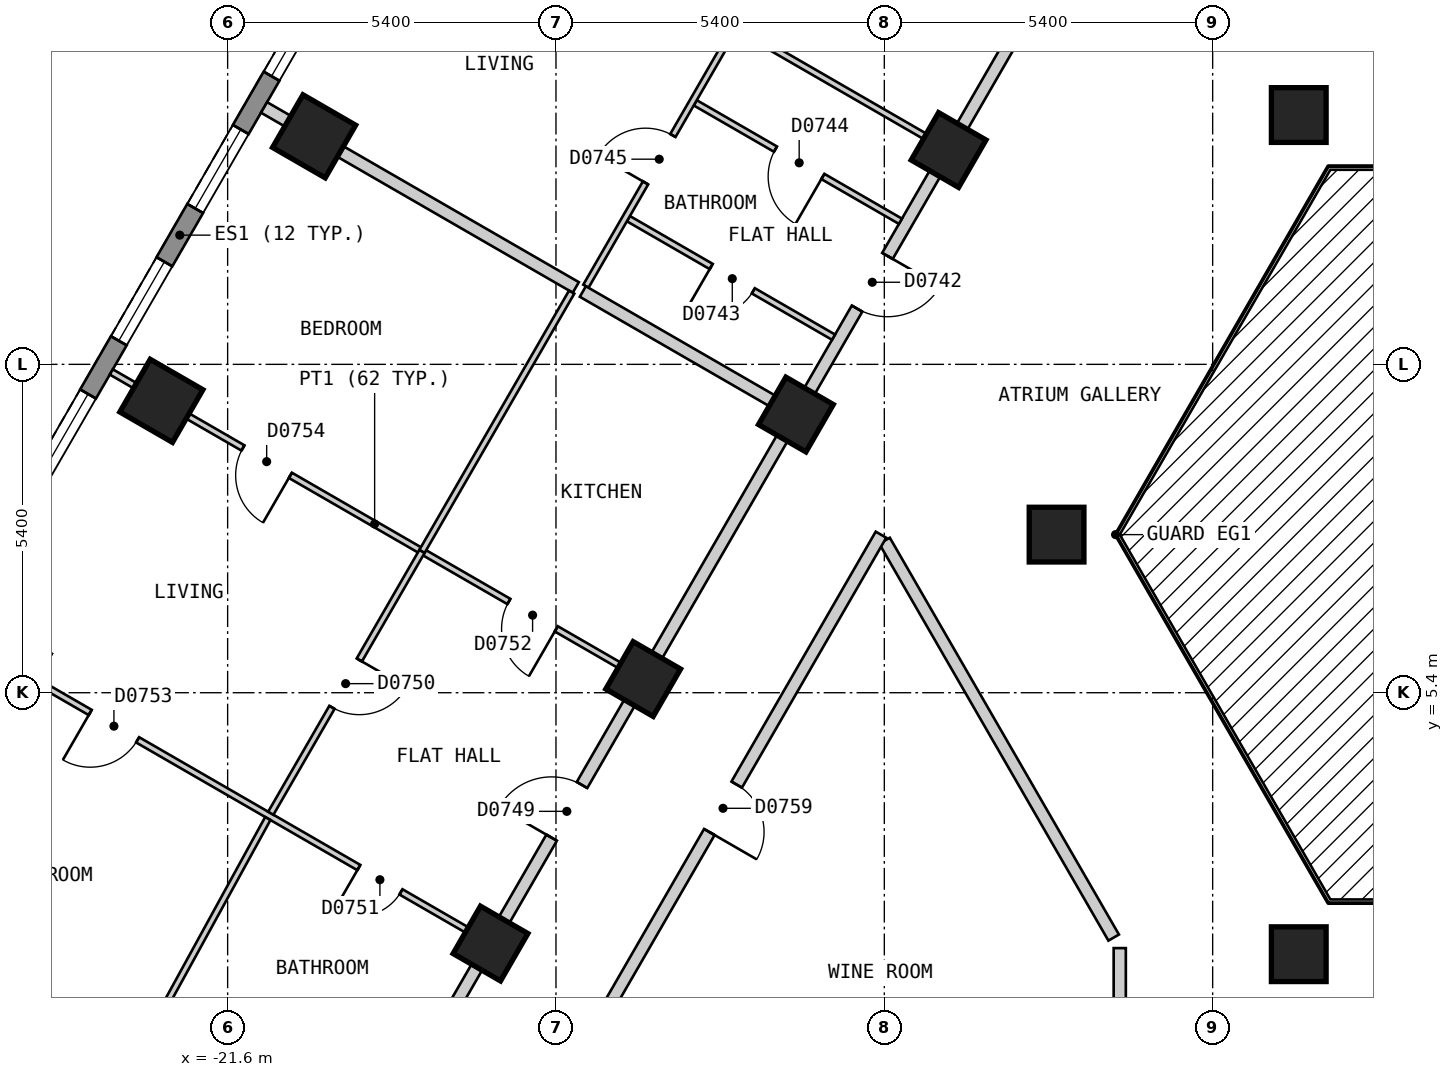
"""IFC4 building model, lengths in metres.
Left out: names, types, materials, properties, quantities, classifications, styles, units other than length and angle.
Written with IfcOpenShell. Run it as: python <this file> out.ifc"""

import sys

from ifc_helpers import new_model, si_unit, direction, frame, frame_2d, origin, origin_2d, place, context, subcontext, project, spatial, polyline, rectangle, outline, extrude, element, fill, save


model = new_model("IFC4")
c1 = context("Model", 3, precision=1e-05, world=origin(), true_north=direction((0.0, 1.0)))
c2 = subcontext(c1, "Body", "Model", "MODEL_VIEW")
j1 = project(units=[si_unit("LENGTHUNIT", "METRE"), si_unit("PLANEANGLEUNIT", "RADIAN")], contexts=[c1])
p1 = place(None, origin())
s1 = spatial("IfcSite", under=j1, at=p1, CompositionType="ELEMENT")
p2 = place(p1, origin())
s2 = spatial("IfcBuilding", under=s1, at=p2, CompositionType="ELEMENT")
p3 = place(p2, frame((0.0, 0.0, 99.0)))
s3 = spatial("IfcBuildingStorey", under=s2, at=p3, CompositionType="ELEMENT", Elevation=99.0)
for number, where, z_axis, x_axis in (
    (1, (-20.178, 14.55, 0.0), (0.0, 0.0, 1.0), (-0.5, -0.866, 0.0)),
    (2, (-22.69, 10.2, 0.0), (0.0, 0.0, 1.0), (-0.5, -0.866, 0.0)),
):
    element("IfcColumn", number, at=place(p3, frame(where, z_axis=z_axis, x_axis=x_axis)), inside=s3, PredefinedType="COLUMN", context=c2, shape_type="SweptSolid", body=[
        extrude(rectangle(XDim=1.0, YDim=1.0, at=origin_2d()), origin(), (0.0, 0.0, 1.0), 3.0),
    ])
for number, where, z_axis, x_axis in (
    (3, (-3.984, 14.9, 0.0), (0.0, 0.0, 1.0), (1.0, 0.0, 0.0)),
    (4, (-9.743, 14.325, 0.0), (0.0, 0.0, 1.0), (-0.5, -0.866, 0.0)),
    (5, (-7.967, 8.0, 0.0), (0.0, 0.0, 1.0), (1.0, 0.0, 0.0)),
    (6, (-12.254, 9.975, 0.0), (0.0, 0.0, 1.0), (-0.5, -0.866, 0.0)),
    (7, (-14.766, 5.625, 0.0), (0.0, 0.0, 1.0), (-0.5, -0.866, 0.0)),
    (8, (-3.984, 1.1, 0.0), (0.0, 0.0, 1.0), (1.0, 0.0, 0.0)),
    (9, (-17.277, 1.275, 0.0), (0.0, 0.0, 1.0), (-0.5, -0.866, 0.0)),
):
    element("IfcColumn", number, at=place(p3, frame(where, z_axis=z_axis, x_axis=x_axis)), inside=s3, PredefinedType="COLUMN", context=c2, shape_type="SweptSolid", body=[
        extrude(rectangle(XDim=0.9, YDim=0.9, at=origin_2d()), origin(), (0.0, 0.0, 1.0), 3.0),
    ])
p4 = place(p3, frame((-15.747, 24.425, 0.0), z_axis=(0.0, 0.0, 1.0), x_axis=(-0.500027479704, -0.866009537788, 0.0)))
e10 = element("IfcWall", 10, at=p4, inside=s3, PredefinedType="SOLIDWALL", context=c2, shape_type="SweptSolid", body=[
    extrude(outline(polyline([(0.0, -0.15), (26.559, -0.15), (26.478, 0.15), (0.08, 0.15), (0.0, -0.15)])), origin(), (0.0, 0.0, 1.0), 2.7),
])
p5 = place(p4, frame((1.227, 0.0, 0.15)))
e11 = element("IfcOpeningElement", 11, at=p5, cuts=e10, PredefinedType="OPENING", context=c2, shape_type="SweptSolid", body=[
    extrude(rectangle(XDim=1.5, YDim=2.1, at=frame_2d((0.75, 1.05))), frame((0.0, 0.16, 0.0), z_axis=(0.0, -1.0, 0.0), x_axis=(1.0, 0.0, 0.0)), (0.0, 0.0, 1.0), 0.32),
])
p6 = place(p4, frame((3.739, 0.0, 0.15)))
e12 = element("IfcOpeningElement", 12, at=p6, cuts=e10, PredefinedType="OPENING", context=c2, shape_type="SweptSolid", body=[
    extrude(rectangle(XDim=1.5, YDim=2.1, at=frame_2d((0.75, 1.05))), frame((0.0, 0.16, 0.0), z_axis=(0.0, -1.0, 0.0), x_axis=(1.0, 0.0, 0.0)), (0.0, 0.0, 1.0), 0.32),
])
p7 = place(p4, frame((6.25, 0.0, 0.15)))
e13 = element("IfcOpeningElement", 13, at=p7, cuts=e10, PredefinedType="OPENING", context=c2, shape_type="SweptSolid", body=[
    extrude(rectangle(XDim=1.5, YDim=2.1, at=frame_2d((0.75, 1.05))), frame((0.0, 0.16, 0.0), z_axis=(0.0, -1.0, 0.0), x_axis=(1.0, 0.0, 0.0)), (0.0, 0.0, 1.0), 0.32),
])
p8 = place(p4, frame((8.761, 0.0, 0.15)))
e14 = element("IfcOpeningElement", 14, at=p8, cuts=e10, PredefinedType="OPENING", context=c2, shape_type="SweptSolid", body=[
    extrude(rectangle(XDim=1.5, YDim=2.1, at=frame_2d((0.75, 1.05))), frame((0.0, 0.16, 0.0), z_axis=(0.0, -1.0, 0.0), x_axis=(1.0, 0.0, 0.0)), (0.0, 0.0, 1.0), 0.32),
])
p9 = place(p4, frame((11.273, 0.0, 0.15)))
e15 = element("IfcOpeningElement", 15, at=p9, cuts=e10, PredefinedType="OPENING", context=c2, shape_type="SweptSolid", body=[
    extrude(rectangle(XDim=1.5, YDim=2.1, at=frame_2d((0.75, 1.05))), frame((0.0, 0.16, 0.0), z_axis=(0.0, -1.0, 0.0), x_axis=(1.0, 0.0, 0.0)), (0.0, 0.0, 1.0), 0.32),
])
p10 = place(p4, frame((13.785, 0.0, 0.15)))
e16 = element("IfcOpeningElement", 16, at=p10, cuts=e10, PredefinedType="OPENING", context=c2, shape_type="SweptSolid", body=[
    extrude(rectangle(XDim=1.5, YDim=2.1, at=frame_2d((0.75, 1.05))), frame((0.0, 0.16, 0.0), z_axis=(0.0, -1.0, 0.0), x_axis=(1.0, 0.0, 0.0)), (0.0, 0.0, 1.0), 0.32),
])
p11 = place(p4, frame((16.296, 0.0, 0.15)))
e17 = element("IfcOpeningElement", 17, at=p11, cuts=e10, PredefinedType="OPENING", context=c2, shape_type="SweptSolid", body=[
    extrude(rectangle(XDim=1.5, YDim=2.1, at=frame_2d((0.75, 1.05))), frame((0.0, 0.16, 0.0), z_axis=(0.0, -1.0, 0.0), x_axis=(1.0, 0.0, 0.0)), (0.0, 0.0, 1.0), 0.32),
])
p12 = place(p4, frame((18.807, 0.0, 0.15)))
e18 = element("IfcOpeningElement", 18, at=p12, cuts=e10, PredefinedType="OPENING", context=c2, shape_type="SweptSolid", body=[
    extrude(rectangle(XDim=1.5, YDim=2.1, at=frame_2d((0.75, 1.05))), frame((0.0, 0.16, 0.0), z_axis=(0.0, -1.0, 0.0), x_axis=(1.0, 0.0, 0.0)), (0.0, 0.0, 1.0), 0.32),
])
p13 = place(p4, frame((21.319, 0.0, 0.15)))
e19 = element("IfcOpeningElement", 19, at=p13, cuts=e10, PredefinedType="OPENING", context=c2, shape_type="SweptSolid", body=[
    extrude(rectangle(XDim=1.5, YDim=2.1, at=frame_2d((0.75, 1.05))), frame((0.0, 0.16, 0.0), z_axis=(0.0, -1.0, 0.0), x_axis=(1.0, 0.0, 0.0)), (0.0, 0.0, 1.0), 0.32),
])
p14 = place(p4, frame((23.831, 0.0, 0.15)))
e20 = element("IfcOpeningElement", 20, at=p14, cuts=e10, PredefinedType="OPENING", context=c2, shape_type="SweptSolid", body=[
    extrude(rectangle(XDim=1.5, YDim=2.1, at=frame_2d((0.75, 1.05))), frame((0.0, 0.16, 0.0), z_axis=(0.0, -1.0, 0.0), x_axis=(1.0, 0.0, 0.0)), (0.0, 0.0, 1.0), 0.32),
])
p15 = place(p3, frame((-10.796, 7.899, 0.0), z_axis=(0.0, 0.0, 1.0), x_axis=(0.500010383074, -0.866019409031, 0.0)))
e21 = element("IfcWall", 21, at=p15, inside=s3, PredefinedType="PARTITIONING", context=c2, shape_type="SweptSolid", body=[
    extrude(rectangle(XDim=7.535, YDim=0.2, at=frame_2d((3.768, 0.0))), origin(), (0.0, 0.0, 1.0), 2.7),
])
p16 = place(p3, frame((-16.05, -1.0, 0.0), z_axis=(0.0, 0.0, 1.0), x_axis=(0.499962449088, 0.866047082728, 0.0)))
e22 = element("IfcWall", 22, at=p16, inside=s3, PredefinedType="PARTITIONING", context=c2, shape_type="SweptSolid", body=[
    extrude(rectangle(XDim=10.391, YDim=0.2, at=frame_2d((5.195, 0.0))), origin(), (0.0, 0.0, 1.0), 2.7),
])
p17 = place(p16, frame((4.745, 0.0, 0.0)))
e23 = element("IfcOpeningElement", 23, at=p17, cuts=e22, PredefinedType="OPENING", context=c2, shape_type="SweptSolid", body=[
    extrude(rectangle(XDim=0.9, YDim=2.1, at=frame_2d((0.45, 1.05))), frame((0.0, 0.11, 0.0), z_axis=(0.0, -1.0, 0.0), x_axis=(1.0, 0.0, 0.0)), (0.0, 0.0, 1.0), 0.22),
])
p18 = place(p3, frame((-18.533, -0.901, 0.0), z_axis=(0.0, 0.0, 1.0), x_axis=(0.499981198768, 0.866036258409, 0.0)))
e24 = element("IfcWall", 24, at=p18, inside=s3, PredefinedType="PARTITIONING", context=c2, shape_type="SweptSolid", body=[
    extrude(rectangle(XDim=20.093, YDim=0.2, at=frame_2d((10.046, 0.0))), origin(), (0.0, 0.0, 1.0), 2.7),
])
p19 = place(p18, frame((14.57, 0.0, 0.0)))
e25 = element("IfcOpeningElement", 25, at=p19, cuts=e24, PredefinedType="OPENING", context=c2, shape_type="SweptSolid", body=[
    extrude(rectangle(XDim=1.0, YDim=2.1, at=frame_2d((0.5, 1.05))), frame((0.0, 0.11, 0.0), z_axis=(0.0, -1.0, 0.0), x_axis=(1.0, 0.0, 0.0)), (0.0, 0.0, 1.0), 0.22),
])
p20 = place(p18, frame((4.523, 0.0, 0.0)))
e26 = element("IfcOpeningElement", 26, at=p20, cuts=e24, PredefinedType="OPENING", context=c2, shape_type="SweptSolid", body=[
    extrude(rectangle(XDim=1.0, YDim=2.1, at=frame_2d((0.5, 1.05))), frame((0.0, 0.11, 0.0), z_axis=(0.0, -1.0, 0.0), x_axis=(1.0, 0.0, 0.0)), (0.0, 0.0, 1.0), 0.22),
])
p21 = place(p3, frame((-6.928, -2.799, 0.0), z_axis=(0.0, 0.0, 1.0), x_axis=(0.0, 1.0, 0.0)))
e27 = element("IfcWall", 27, at=p21, inside=s3, PredefinedType="PARTITIONING", context=c2, shape_type="SweptSolid", body=[
    extrude(rectangle(XDim=3.999, YDim=0.2, at=frame_2d((2.0, 0.0))), origin(), (0.0, 0.0, 1.0), 2.7),
])
p22 = place(p3, frame((-26.025, 6.325, 0.0), z_axis=(0.0, 0.0, 1.0), x_axis=(0.866041268327, -0.499972520799, 0.0)))
e28 = element("IfcWall", 28, at=p22, inside=s3, PredefinedType="PARTITIONING", context=c2, shape_type="SweptSolid", body=[
    extrude(rectangle(XDim=10.0, YDim=0.1, at=frame_2d((5.0, 0.0))), origin(), (0.0, 0.0, 1.0), 2.7),
])
p23 = place(p22, frame((7.601, 0.0, 0.0)))
e29 = element("IfcOpeningElement", 29, at=p23, cuts=e28, PredefinedType="OPENING", context=c2, shape_type="SweptSolid", body=[
    extrude(rectangle(XDim=0.8, YDim=2.1, at=frame_2d((0.4, 1.05))), frame((0.0, 0.06, 0.0), z_axis=(0.0, -1.0, 0.0), x_axis=(1.0, 0.0, 0.0)), (0.0, 0.0, 1.0), 0.12),
])
p24 = place(p22, frame((2.5, 0.0, 0.0)))
e30 = element("IfcOpeningElement", 30, at=p24, cuts=e28, PredefinedType="OPENING", context=c2, shape_type="SweptSolid", body=[
    extrude(rectangle(XDim=0.9, YDim=2.1, at=frame_2d((0.45, 1.05))), frame((0.0, 0.06, 0.0), z_axis=(0.0, -1.0, 0.0), x_axis=(1.0, 0.0, 0.0)), (0.0, 0.0, 1.0), 0.12),
])
p25 = place(p3, frame((-23.513, 10.675, 0.0), z_axis=(0.0, 0.0, 1.0), x_axis=(0.866041268327, -0.499972520799, 0.0)))
e31 = element("IfcWall", 31, at=p25, inside=s3, PredefinedType="PARTITIONING", context=c2, shape_type="SweptSolid", body=[
    extrude(rectangle(XDim=10.0, YDim=0.1, at=frame_2d((5.0, 0.0))), origin(), (0.0, 0.0, 1.0), 2.7),
])
p26 = place(p25, frame((7.55, 0.0, 0.0)))
e32 = element("IfcOpeningElement", 32, at=p26, cuts=e31, PredefinedType="OPENING", context=c2, shape_type="SweptSolid", body=[
    extrude(rectangle(XDim=0.9, YDim=2.1, at=frame_2d((0.45, 1.05))), frame((0.0, 0.06, 0.0), z_axis=(0.0, -1.0, 0.0), x_axis=(1.0, 0.0, 0.0)), (0.0, 0.0, 1.0), 0.12),
])
p27 = place(p25, frame((2.5, 0.0, 0.0)))
e33 = element("IfcOpeningElement", 33, at=p27, cuts=e31, PredefinedType="OPENING", context=c2, shape_type="SweptSolid", body=[
    extrude(rectangle(XDim=0.9, YDim=2.1, at=frame_2d((0.45, 1.05))), frame((0.0, 0.06, 0.0), z_axis=(0.0, -1.0, 0.0), x_axis=(1.0, 0.0, 0.0)), (0.0, 0.0, 1.0), 0.12),
])
p28 = place(p3, frame((-15.009, 13.196, 0.0), z_axis=(0.0, 0.0, 1.0), x_axis=(0.865916335424, -0.500188864377, 0.0)))
e34 = element("IfcWall", 34, at=p28, inside=s3, PredefinedType="PARTITIONING", context=c2, shape_type="SweptSolid", body=[
    extrude(rectangle(XDim=3.896, YDim=0.1, at=frame_2d((1.948, 0.0))), origin(), (0.0, 0.0, 1.0), 2.7),
])
p29 = place(p28, frame((1.573, 0.0, 0.0)))
e35 = element("IfcOpeningElement", 35, at=p29, cuts=e34, PredefinedType="OPENING", context=c2, shape_type="SweptSolid", body=[
    extrude(rectangle(XDim=0.8, YDim=2.1, at=frame_2d((0.4, 1.05))), frame((0.0, 0.06, 0.0), z_axis=(0.0, -1.0, 0.0), x_axis=(1.0, 0.0, 0.0)), (0.0, 0.0, 1.0), 0.12),
])
p30 = place(p3, frame((-13.909, 15.101, 0.0), z_axis=(0.0, 0.0, 1.0), x_axis=(0.866024880635, -0.500000906121, 0.0)))
e36 = element("IfcWall", 36, at=p30, inside=s3, PredefinedType="PARTITIONING", context=c2, shape_type="SweptSolid", body=[
    extrude(rectangle(XDim=3.896, YDim=0.1, at=frame_2d((1.948, 0.0))), origin(), (0.0, 0.0, 1.0), 2.7),
])
p31 = place(p30, frame((1.523, 0.0, 0.0)))
e37 = element("IfcOpeningElement", 37, at=p31, cuts=e36, PredefinedType="OPENING", context=c2, shape_type="SweptSolid", body=[
    extrude(rectangle(XDim=0.9, YDim=2.1, at=frame_2d((0.45, 1.05))), frame((0.0, 0.06, 0.0), z_axis=(0.0, -1.0, 0.0), x_axis=(1.0, 0.0, 0.0)), (0.0, 0.0, 1.0), 0.12),
])
p32 = place(p3, frame((-18.489, 19.375, 0.0), z_axis=(0.0, 0.0, 1.0), x_axis=(0.866016855193, -0.500014806302, 0.0)))
e38 = element("IfcWall", 38, at=p32, inside=s3, PredefinedType="PARTITIONING", context=c2, shape_type="SweptSolid", body=[
    extrude(rectangle(XDim=10.0, YDim=0.1, at=frame_2d((5.0, 0.0))), origin(), (0.0, 0.0, 1.0), 2.7),
])
p33 = place(p32, frame((2.577, 0.0, 0.0)))
e39 = element("IfcOpeningElement", 39, at=p33, cuts=e38, PredefinedType="OPENING", context=c2, shape_type="SweptSolid", body=[
    extrude(rectangle(XDim=0.9, YDim=2.1, at=frame_2d((0.45, 1.05))), frame((0.0, 0.06, 0.0), z_axis=(0.0, -1.0, 0.0), x_axis=(1.0, 0.0, 0.0)), (0.0, 0.0, 1.0), 0.12),
])
p34 = place(p3, frame((-15.708, 12.085, 0.0), z_axis=(0.0, 0.0, 1.0), x_axis=(0.499943653708, 0.866057932887, 0.0)))
e40 = element("IfcWall", 40, at=p34, inside=s3, PredefinedType="PARTITIONING", context=c2, shape_type="SweptSolid", body=[
    extrude(rectangle(XDim=4.873, YDim=0.1, at=frame_2d((2.436, 0.0))), origin(), (0.0, 0.0, 1.0), 2.7),
])
p35 = place(p34, frame((1.962, 0.0, 0.0)))
e41 = element("IfcOpeningElement", 41, at=p35, cuts=e40, PredefinedType="OPENING", context=c2, shape_type="SweptSolid", body=[
    extrude(rectangle(XDim=0.9, YDim=2.1, at=frame_2d((0.45, 1.05))), frame((0.0, 0.06, 0.0), z_axis=(0.0, -1.0, 0.0), x_axis=(1.0, 0.0, 0.0)), (0.0, 0.0, 1.0), 0.12),
])
p36 = place(p3, frame((-20.89, 3.418, 0.0), z_axis=(0.0, 0.0, 1.0), x_axis=(0.500014231302, 0.866017187182, 0.0)))
e42 = element("IfcWall", 42, at=p36, inside=s3, PredefinedType="PARTITIONING", context=c2, shape_type="SweptSolid", body=[
    extrude(rectangle(XDim=4.973, YDim=0.1, at=frame_2d((2.487, 0.0))), origin(), (0.0, 0.0, 1.0), 2.7),
])
p37 = place(p36, frame((2.011, 0.0, 0.0)))
e43 = element("IfcOpeningElement", 43, at=p37, cuts=e42, PredefinedType="OPENING", context=c2, shape_type="SweptSolid", body=[
    extrude(rectangle(XDim=0.9, YDim=2.1, at=frame_2d((0.45, 1.05))), frame((0.0, 0.06, 0.0), z_axis=(0.0, -1.0, 0.0), x_axis=(1.0, 0.0, 0.0)), (0.0, 0.0, 1.0), 0.12),
])
p38 = place(p3, frame((-23.261, -0.901, 0.0), z_axis=(0.0, 0.0, 1.0), x_axis=(0.481037050261, 0.876700265927, 0.0)))
e44 = element("IfcWall", 44, at=p38, inside=s3, PredefinedType="PARTITIONING", context=c2, shape_type="SweptSolid", body=[
    extrude(rectangle(XDim=4.827, YDim=0.1, at=frame_2d((2.414, 0.0))), origin(), (0.0, 0.0, 1.0), 2.7),
])
p39 = place(p3, frame((-21.001, 15.025, 0.0), z_axis=(0.0, 0.0, 1.0), x_axis=(0.866031754707, -0.499988999718, 0.0)))
e45 = element("IfcWall", 45, at=p39, inside=s3, PredefinedType="PARTITIONING", context=c2, shape_type="SweptSolid", body=[
    extrude(rectangle(XDim=5.92, YDim=0.2, at=frame_2d((2.96, 0.0))), origin(), (0.0, 0.0, 1.0), 2.7),
])
p40 = place(p3, frame((-15.758, 11.998, 0.0), z_axis=(0.0, 0.0, 1.0), x_axis=(0.865987741337, -0.5000652276, 0.0)))
e46 = element("IfcWall", 46, at=p40, inside=s3, PredefinedType="PARTITIONING", context=c2, shape_type="SweptSolid", body=[
    extrude(rectangle(XDim=3.946, YDim=0.2, at=frame_2d((1.973, 0.0))), origin(), (0.0, 0.0, 1.0), 2.7),
])
p41 = place(p3, frame((-18.403, 7.725, 0.0), z_axis=(0.0, 0.0, 1.0), x_axis=(0.499995794706, 0.866027831699, 0.0)))
e47 = element("IfcWall", 47, at=p41, inside=s3, PredefinedType="PARTITIONING", context=c2, shape_type="SweptSolid", body=[
    extrude(rectangle(XDim=4.922, YDim=0.1, at=frame_2d((2.461, 0.0))), origin(), (0.0, 0.0, 1.0), 2.7),
])
p42 = place(p8, origin())
e48 = element("IfcWindow", 48, at=p42, inside=s3, PartitioningType="SINGLE_PANEL", PredefinedType="WINDOW", context=c2, shape_type="SweptSolid", body=[
    extrude(rectangle(XDim=1.5, YDim=2.1, at=frame_2d((0.75, 1.05))), frame((0.0, 0.03, 0.0), z_axis=(0.0, -1.0, 0.0), x_axis=(1.0, 0.0, 0.0)), (0.0, 0.0, 1.0), 0.06),
])
fill(e14, e48)
p43 = place(p9, origin())
e49 = element("IfcWindow", 49, at=p43, inside=s3, PartitioningType="SINGLE_PANEL", PredefinedType="WINDOW", context=c2, shape_type="SweptSolid", body=[
    extrude(rectangle(XDim=1.5, YDim=2.1, at=frame_2d((0.75, 1.05))), frame((0.0, 0.03, 0.0), z_axis=(0.0, -1.0, 0.0), x_axis=(1.0, 0.0, 0.0)), (0.0, 0.0, 1.0), 0.06),
])
fill(e15, e49)
p44 = place(p10, origin())
e50 = element("IfcWindow", 50, at=p44, inside=s3, PartitioningType="SINGLE_PANEL", PredefinedType="WINDOW", context=c2, shape_type="SweptSolid", body=[
    extrude(rectangle(XDim=1.5, YDim=2.1, at=frame_2d((0.75, 1.05))), frame((0.0, 0.03, 0.0), z_axis=(0.0, -1.0, 0.0), x_axis=(1.0, 0.0, 0.0)), (0.0, 0.0, 1.0), 0.06),
])
fill(e16, e50)
p45 = place(p11, origin())
e51 = element("IfcWindow", 51, at=p45, inside=s3, PartitioningType="SINGLE_PANEL", PredefinedType="WINDOW", context=c2, shape_type="SweptSolid", body=[
    extrude(rectangle(XDim=1.5, YDim=2.1, at=frame_2d((0.75, 1.05))), frame((0.0, 0.03, 0.0), z_axis=(0.0, -1.0, 0.0), x_axis=(1.0, 0.0, 0.0)), (0.0, 0.0, 1.0), 0.06),
])
fill(e17, e51)
p46 = place(p19, origin())
e52 = element("IfcDoor", 52, at=p46, inside=s3, OperationType="SINGLE_SWING_RIGHT", PredefinedType="DOOR", context=c2, shape_type="SweptSolid", body=[
    extrude(rectangle(XDim=1.0, YDim=2.1, at=frame_2d((0.5, 1.05))), frame((0.0, 0.025, 0.0), z_axis=(0.0, -1.0, 0.0), x_axis=(1.0, 0.0, 0.0)), (0.0, 0.0, 1.0), 0.05),
])
fill(e25, e52)
p47 = place(p29, origin())
e53 = element("IfcDoor", 53, at=p47, inside=s3, OperationType="SINGLE_SWING_LEFT", PredefinedType="DOOR", context=c2, shape_type="SweptSolid", body=[
    extrude(rectangle(XDim=0.8, YDim=2.1, at=frame_2d((0.4, 1.05))), frame((0.0, 0.025, 0.0), z_axis=(0.0, -1.0, 0.0), x_axis=(1.0, 0.0, 0.0)), (0.0, 0.0, 1.0), 0.05),
])
fill(e35, e53)
p48 = place(p31, origin())
e54 = element("IfcDoor", 54, at=p48, inside=s3, OperationType="SINGLE_SWING_RIGHT", PredefinedType="DOOR", context=c2, shape_type="SweptSolid", body=[
    extrude(rectangle(XDim=0.9, YDim=2.1, at=frame_2d((0.45, 1.05))), frame((0.0, 0.025, 0.0), z_axis=(0.0, -1.0, 0.0), x_axis=(1.0, 0.0, 0.0)), (0.0, 0.0, 1.0), 0.05),
])
fill(e37, e54)
p49 = place(p35, origin())
e55 = element("IfcDoor", 55, at=p49, inside=s3, OperationType="SINGLE_SWING_LEFT", PredefinedType="DOOR", context=c2, shape_type="SweptSolid", body=[
    extrude(rectangle(XDim=0.9, YDim=2.1, at=frame_2d((0.45, 1.05))), frame((0.0, 0.025, 0.0), z_axis=(0.0, -1.0, 0.0), x_axis=(1.0, 0.0, 0.0)), (0.0, 0.0, 1.0), 0.05),
])
fill(e41, e55)
p50 = place(p20, origin())
e56 = element("IfcDoor", 56, at=p50, inside=s3, OperationType="SINGLE_SWING_LEFT", PredefinedType="DOOR", context=c2, shape_type="SweptSolid", body=[
    extrude(rectangle(XDim=1.0, YDim=2.1, at=frame_2d((0.5, 1.05))), frame((0.0, 0.025, 0.0), z_axis=(0.0, -1.0, 0.0), x_axis=(1.0, 0.0, 0.0)), (0.0, 0.0, 1.0), 0.05),
])
fill(e26, e56)
p51 = place(p37, origin())
e57 = element("IfcDoor", 57, at=p51, inside=s3, OperationType="SINGLE_SWING_RIGHT", PredefinedType="DOOR", context=c2, shape_type="SweptSolid", body=[
    extrude(rectangle(XDim=0.9, YDim=2.1, at=frame_2d((0.45, 1.05))), frame((0.0, 0.025, 0.0), z_axis=(0.0, -1.0, 0.0), x_axis=(1.0, 0.0, 0.0)), (0.0, 0.0, 1.0), 0.05),
])
fill(e43, e57)
p52 = place(p23, origin())
e58 = element("IfcDoor", 58, at=p52, inside=s3, OperationType="SINGLE_SWING_LEFT", PredefinedType="DOOR", context=c2, shape_type="SweptSolid", body=[
    extrude(rectangle(XDim=0.8, YDim=2.1, at=frame_2d((0.4, 1.05))), frame((0.0, 0.025, 0.0), z_axis=(0.0, -1.0, 0.0), x_axis=(1.0, 0.0, 0.0)), (0.0, 0.0, 1.0), 0.05),
])
fill(e29, e58)
p53 = place(p26, origin())
e59 = element("IfcDoor", 59, at=p53, inside=s3, OperationType="SINGLE_SWING_RIGHT", PredefinedType="DOOR", context=c2, shape_type="SweptSolid", body=[
    extrude(rectangle(XDim=0.9, YDim=2.1, at=frame_2d((0.45, 1.05))), frame((0.0, 0.025, 0.0), z_axis=(0.0, -1.0, 0.0), x_axis=(1.0, 0.0, 0.0)), (0.0, 0.0, 1.0), 0.05),
])
fill(e32, e59)
p54 = place(p24, origin())
e60 = element("IfcDoor", 60, at=p54, inside=s3, OperationType="SINGLE_SWING_LEFT", PredefinedType="DOOR", context=c2, shape_type="SweptSolid", body=[
    extrude(rectangle(XDim=0.9, YDim=2.1, at=frame_2d((0.45, 1.05))), frame((0.0, 0.025, 0.0), z_axis=(0.0, -1.0, 0.0), x_axis=(1.0, 0.0, 0.0)), (0.0, 0.0, 1.0), 0.05),
])
fill(e30, e60)
p55 = place(p27, origin())
e61 = element("IfcDoor", 61, at=p55, inside=s3, OperationType="SINGLE_SWING_RIGHT", PredefinedType="DOOR", context=c2, shape_type="SweptSolid", body=[
    extrude(rectangle(XDim=0.9, YDim=2.1, at=frame_2d((0.45, 1.05))), frame((0.0, 0.025, 0.0), z_axis=(0.0, -1.0, 0.0), x_axis=(1.0, 0.0, 0.0)), (0.0, 0.0, 1.0), 0.05),
])
fill(e33, e61)
p56 = place(p17, origin())
e62 = element("IfcDoor", 62, at=p56, inside=s3, OperationType="SINGLE_SWING_LEFT", PredefinedType="DOOR", context=c2, shape_type="SweptSolid", body=[
    extrude(rectangle(XDim=0.9, YDim=2.1, at=frame_2d((0.45, 1.05))), frame((0.0, 0.025, 0.0), z_axis=(0.0, -1.0, 0.0), x_axis=(1.0, 0.0, 0.0)), (0.0, 0.0, 1.0), 0.05),
])
fill(e23, e62)
save(model, sys.argv[1])
